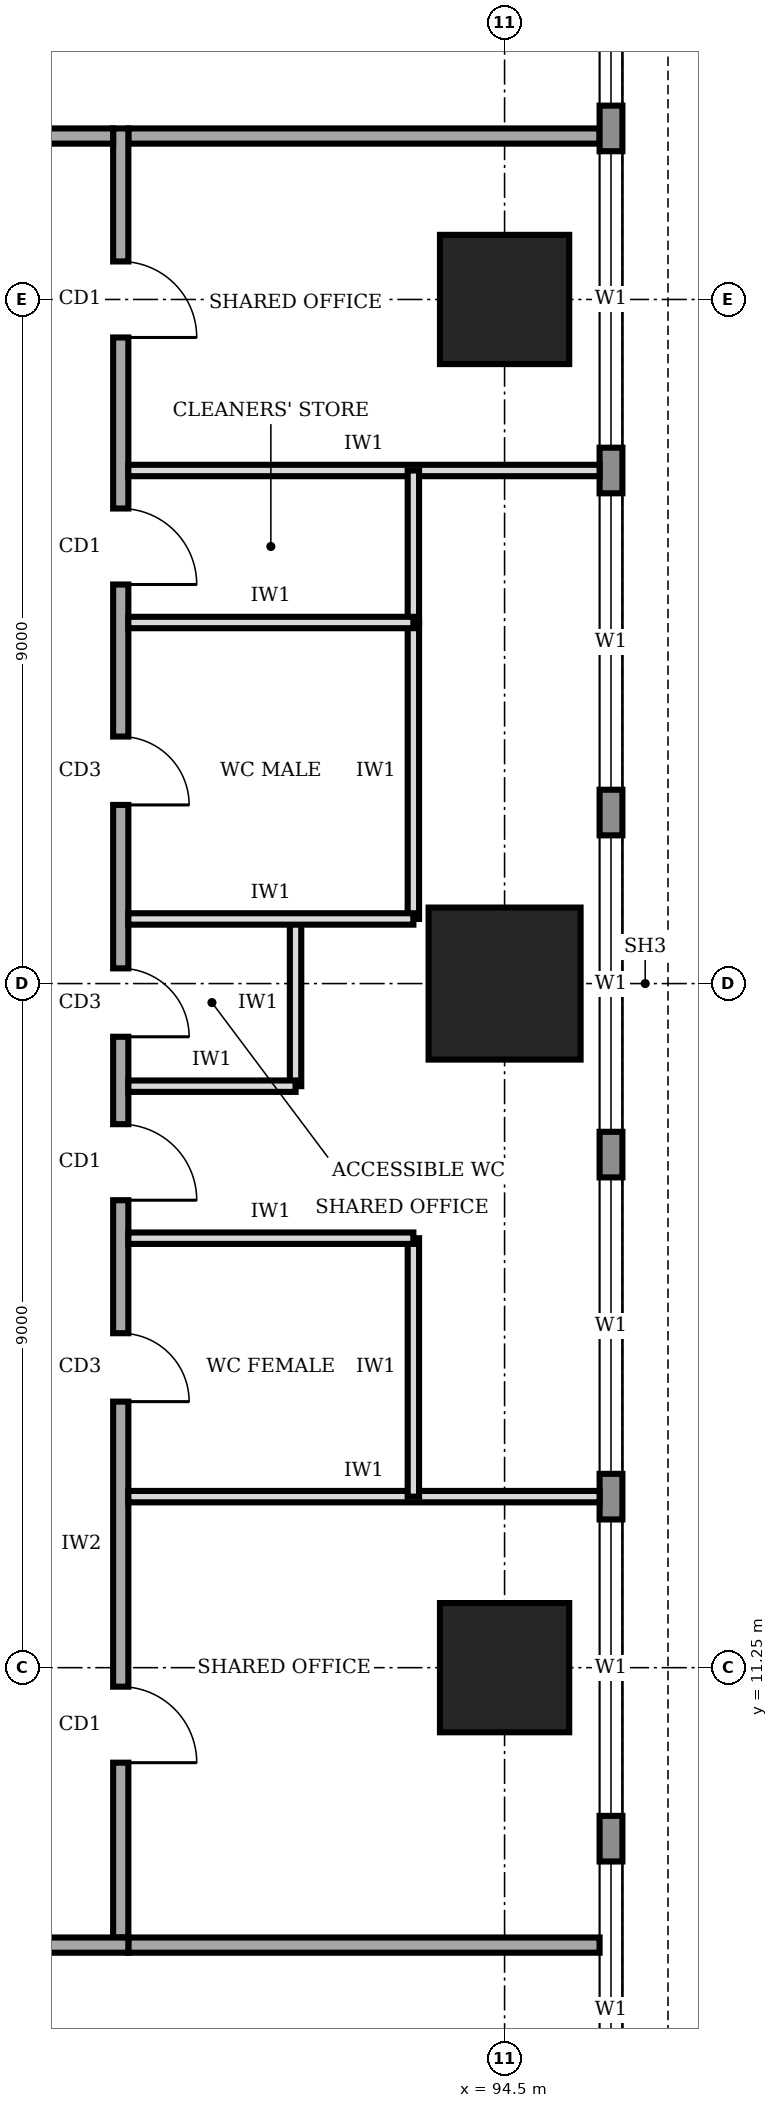
"""IFC4 building model, lengths in metres.
Left out: names, types, materials, properties, quantities, classifications, styles, units other than length and angle.
Written with IfcOpenShell. Run it as: python <this file> out.ifc"""

import sys

from ifc_helpers import new_model, si_unit, direction, frame, frame_2d, origin, origin_2d, place, context, subcontext, project, spatial, rectangle, extrude, element, fill, save


model = new_model("IFC4")
c1 = context("Model", 3, precision=1e-05, world=origin(), true_north=direction((0.0, 1.0)))
c2 = subcontext(c1, "Body", "Model", "MODEL_VIEW")
j1 = project(units=[si_unit("LENGTHUNIT", "METRE"), si_unit("PLANEANGLEUNIT", "RADIAN")], contexts=[c1])
p1 = place(None, origin())
s1 = spatial("IfcSite", under=j1, at=p1, CompositionType="ELEMENT")
p2 = place(p1, origin())
s2 = spatial("IfcBuilding", under=s1, at=p2, CompositionType="ELEMENT")
p3 = place(p2, frame((0.0, 0.0, 209.0)))
s3 = spatial("IfcBuildingStorey", under=s2, at=p3, CompositionType="ELEMENT", Elevation=209.0)
p4 = place(p3, frame((94.5, 11.25, 0.0), z_axis=(0.0, 0.0, 1.0), x_axis=(1.0, 0.0, 0.0)))
e1 = element("IfcColumn", 1, at=p4, inside=s3, PredefinedType="COLUMN", context=c2, shape_type="SweptSolid", body=[
    extrude(rectangle(XDim=1.7, YDim=1.7, at=origin_2d()), origin(), (0.0, 0.0, 1.0), 4.0),
])
p5 = place(p3, frame((94.5, 20.25, 0.0), z_axis=(0.0, 0.0, 1.0), x_axis=(1.0, 0.0, 0.0)))
e2 = element("IfcColumn", 2, at=p5, inside=s3, PredefinedType="COLUMN", context=c2, shape_type="SweptSolid", body=[
    extrude(rectangle(XDim=2.0, YDim=2.0, at=origin_2d()), origin(), (0.0, 0.0, 1.0), 4.0),
])
p6 = place(p3, frame((94.5, 29.25, 0.0), z_axis=(0.0, 0.0, 1.0), x_axis=(1.0, 0.0, 0.0)))
e3 = element("IfcColumn", 3, at=p6, inside=s3, PredefinedType="COLUMN", context=c2, shape_type="SweptSolid", body=[
    extrude(rectangle(XDim=1.7, YDim=1.7, at=origin_2d()), origin(), (0.0, 0.0, 1.0), 4.0),
])
p7 = place(p3, frame((95.9, 3.32, 0.0), z_axis=(0.0, 0.0, 1.0), x_axis=(0.0, 1.0, 0.0)))
e4 = element("IfcWall", 4, at=p7, inside=s3, PredefinedType="STANDARD", context=c2, shape_type="SweptSolid", body=[
    extrude(rectangle(XDim=33.86, YDim=0.3, at=frame_2d((16.93, 0.0))), origin(), (0.0, 0.0, 1.0), 3.75),
])
p8 = place(p7, frame((1.48, 0.0, 0.9)))
e5 = element("IfcOpeningElement", 5, at=p8, cuts=e4, PredefinedType="OPENING", context=c2, shape_type="SweptSolid", body=[
    extrude(rectangle(XDim=3.9, YDim=2.2, at=frame_2d((1.95, 1.1))), frame((0.0, 0.16, 0.0), z_axis=(0.0, -1.0, 0.0), x_axis=(1.0, 0.0, 0.0)), (0.0, 0.0, 1.0), 0.32),
])
p9 = place(p7, frame((5.98, 0.0, 0.9)))
e6 = element("IfcOpeningElement", 6, at=p9, cuts=e4, PredefinedType="OPENING", context=c2, shape_type="SweptSolid", body=[
    extrude(rectangle(XDim=3.9, YDim=2.2, at=frame_2d((1.95, 1.1))), frame((0.0, 0.16, 0.0), z_axis=(0.0, -1.0, 0.0), x_axis=(1.0, 0.0, 0.0)), (0.0, 0.0, 1.0), 0.32),
])
p10 = place(p7, frame((10.48, 0.0, 0.9)))
e7 = element("IfcOpeningElement", 7, at=p10, cuts=e4, PredefinedType="OPENING", context=c2, shape_type="SweptSolid", body=[
    extrude(rectangle(XDim=3.9, YDim=2.2, at=frame_2d((1.95, 1.1))), frame((0.0, 0.16, 0.0), z_axis=(0.0, -1.0, 0.0), x_axis=(1.0, 0.0, 0.0)), (0.0, 0.0, 1.0), 0.32),
])
p11 = place(p7, frame((14.98, 0.0, 0.9)))
e8 = element("IfcOpeningElement", 8, at=p11, cuts=e4, PredefinedType="OPENING", context=c2, shape_type="SweptSolid", body=[
    extrude(rectangle(XDim=3.9, YDim=2.2, at=frame_2d((1.95, 1.1))), frame((0.0, 0.16, 0.0), z_axis=(0.0, -1.0, 0.0), x_axis=(1.0, 0.0, 0.0)), (0.0, 0.0, 1.0), 0.32),
])
p12 = place(p7, frame((19.48, 0.0, 0.9)))
e9 = element("IfcOpeningElement", 9, at=p12, cuts=e4, PredefinedType="OPENING", context=c2, shape_type="SweptSolid", body=[
    extrude(rectangle(XDim=3.9, YDim=2.2, at=frame_2d((1.95, 1.1))), frame((0.0, 0.16, 0.0), z_axis=(0.0, -1.0, 0.0), x_axis=(1.0, 0.0, 0.0)), (0.0, 0.0, 1.0), 0.32),
])
p13 = place(p7, frame((23.98, 0.0, 0.9)))
e10 = element("IfcOpeningElement", 10, at=p13, cuts=e4, PredefinedType="OPENING", context=c2, shape_type="SweptSolid", body=[
    extrude(rectangle(XDim=3.9, YDim=2.2, at=frame_2d((1.95, 1.1))), frame((0.0, 0.16, 0.0), z_axis=(0.0, -1.0, 0.0), x_axis=(1.0, 0.0, 0.0)), (0.0, 0.0, 1.0), 0.32),
])
p14 = place(p7, frame((28.48, 0.0, 0.9)))
e11 = element("IfcOpeningElement", 11, at=p14, cuts=e4, PredefinedType="OPENING", context=c2, shape_type="SweptSolid", body=[
    extrude(rectangle(XDim=3.9, YDim=2.2, at=frame_2d((1.95, 1.1))), frame((0.0, 0.16, 0.0), z_axis=(0.0, -1.0, 0.0), x_axis=(1.0, 0.0, 0.0)), (0.0, 0.0, 1.0), 0.32),
])
p15 = place(p3, frame((72.65, 7.6, 0.0), z_axis=(0.0, 0.0, 1.0), x_axis=(1.0, 0.0, 0.0)))
e12 = element("IfcWall", 12, at=p15, inside=s3, PredefinedType="SOLIDWALL", context=c2, shape_type="SweptSolid", body=[
    extrude(rectangle(XDim=16.9, YDim=0.2, at=frame_2d((8.45, 0.0))), origin(), (0.0, 0.0, 1.0), 3.75),
])
p16 = place(p15, frame((7.45, 0.0, 0.0)))
e13 = element("IfcOpeningElement", 13, at=p16, cuts=e12, PredefinedType="OPENING", context=c2, shape_type="SweptSolid", body=[
    extrude(rectangle(XDim=1.8, YDim=2.1, at=frame_2d((0.9, 1.05))), frame((0.0, 0.11, 0.0), z_axis=(0.0, -1.0, 0.0), x_axis=(1.0, 0.0, 0.0)), (0.0, 0.0, 1.0), 0.22),
])
p17 = place(p3, frame((89.45, 7.7, 0.0), z_axis=(0.0, 0.0, 1.0), x_axis=(0.0, 1.0, 0.0)))
e14 = element("IfcWall", 14, at=p17, inside=s3, PredefinedType="SOLIDWALL", context=c2, shape_type="SweptSolid", body=[
    extrude(rectangle(XDim=23.8, YDim=0.2, at=frame_2d((11.9, 0.0))), origin(), (0.0, 0.0, 1.0), 3.75),
])
p18 = place(p17, frame((2.3, 0.0, 0.0)))
e15 = element("IfcOpeningElement", 15, at=p18, cuts=e14, PredefinedType="OPENING", context=c2, shape_type="SweptSolid", body=[
    extrude(rectangle(XDim=1.0, YDim=2.1, at=frame_2d((0.5, 1.05))), frame((0.0, 0.11, 0.0), z_axis=(0.0, -1.0, 0.0), x_axis=(1.0, 0.0, 0.0)), (0.0, 0.0, 1.0), 0.22),
])
p19 = place(p17, frame((7.05, 0.0, 0.0)))
e16 = element("IfcOpeningElement", 16, at=p19, cuts=e14, PredefinedType="OPENING", context=c2, shape_type="SweptSolid", body=[
    extrude(rectangle(XDim=0.9, YDim=2.1, at=frame_2d((0.45, 1.05))), frame((0.0, 0.11, 0.0), z_axis=(0.0, -1.0, 0.0), x_axis=(1.0, 0.0, 0.0)), (0.0, 0.0, 1.0), 0.22),
])
p20 = place(p17, frame((11.85, 0.0, 0.0)))
e17 = element("IfcOpeningElement", 17, at=p20, cuts=e14, PredefinedType="OPENING", context=c2, shape_type="SweptSolid", body=[
    extrude(rectangle(XDim=0.9, YDim=2.1, at=frame_2d((0.45, 1.05))), frame((0.0, 0.11, 0.0), z_axis=(0.0, -1.0, 0.0), x_axis=(1.0, 0.0, 0.0)), (0.0, 0.0, 1.0), 0.22),
])
p21 = place(p17, frame((14.9, 0.0, 0.0)))
e18 = element("IfcOpeningElement", 18, at=p21, cuts=e14, PredefinedType="OPENING", context=c2, shape_type="SweptSolid", body=[
    extrude(rectangle(XDim=0.9, YDim=2.1, at=frame_2d((0.45, 1.05))), frame((0.0, 0.11, 0.0), z_axis=(0.0, -1.0, 0.0), x_axis=(1.0, 0.0, 0.0)), (0.0, 0.0, 1.0), 0.22),
])
p22 = place(p17, frame((17.8, 0.0, 0.0)))
e19 = element("IfcOpeningElement", 19, at=p22, cuts=e14, PredefinedType="OPENING", context=c2, shape_type="SweptSolid", body=[
    extrude(rectangle(XDim=1.0, YDim=2.1, at=frame_2d((0.5, 1.05))), frame((0.0, 0.11, 0.0), z_axis=(0.0, -1.0, 0.0), x_axis=(1.0, 0.0, 0.0)), (0.0, 0.0, 1.0), 0.22),
])
p23 = place(p17, frame((9.7, 0.0, 0.0)))
e20 = element("IfcOpeningElement", 20, at=p23, cuts=e14, PredefinedType="OPENING", context=c2, shape_type="SweptSolid", body=[
    extrude(rectangle(XDim=1.0, YDim=2.1, at=frame_2d((0.5, 1.05))), frame((0.0, 0.11, 0.0), z_axis=(0.0, -1.0, 0.0), x_axis=(1.0, 0.0, 0.0)), (0.0, 0.0, 1.0), 0.22),
])
p24 = place(p17, frame((21.05, 0.0, 0.0)))
e21 = element("IfcOpeningElement", 21, at=p24, cuts=e14, PredefinedType="OPENING", context=c2, shape_type="SweptSolid", body=[
    extrude(rectangle(XDim=1.0, YDim=2.1, at=frame_2d((0.5, 1.05))), frame((0.0, 0.11, 0.0), z_axis=(0.0, -1.0, 0.0), x_axis=(1.0, 0.0, 0.0)), (0.0, 0.0, 1.0), 0.22),
])
p25 = place(p3, frame((89.35, 31.4, 0.0), z_axis=(0.0, 0.0, 1.0), x_axis=(-1.0, 0.0, 0.0)))
e22 = element("IfcWall", 22, at=p25, inside=s3, PredefinedType="SOLIDWALL", context=c2, shape_type="SweptSolid", body=[
    extrude(rectangle(XDim=16.9, YDim=0.2, at=frame_2d((8.45, 0.0))), origin(), (0.0, 0.0, 1.0), 3.75),
])
p26 = place(p25, frame((14.375, 0.0, 0.0)))
e23 = element("IfcOpeningElement", 23, at=p26, cuts=e22, PredefinedType="OPENING", context=c2, shape_type="SweptSolid", body=[
    extrude(rectangle(XDim=1.0, YDim=2.1, at=frame_2d((0.5, 1.05))), frame((0.0, 0.11, 0.0), z_axis=(0.0, -1.0, 0.0), x_axis=(1.0, 0.0, 0.0)), (0.0, 0.0, 1.0), 0.22),
])
p27 = place(p25, frame((10.1, 0.0, 0.0)))
e24 = element("IfcOpeningElement", 24, at=p27, cuts=e22, PredefinedType="OPENING", context=c2, shape_type="SweptSolid", body=[
    extrude(rectangle(XDim=1.0, YDim=2.1, at=frame_2d((0.5, 1.05))), frame((0.0, 0.11, 0.0), z_axis=(0.0, -1.0, 0.0), x_axis=(1.0, 0.0, 0.0)), (0.0, 0.0, 1.0), 0.22),
])
for number, where, z_axis, x_axis in (
    (25, (89.55, 7.6, 0.0), (0.0, 0.0, 1.0), (1.0, 0.0, 0.0)),
    (26, (89.55, 31.4, 0.0), (0.0, 0.0, 1.0), (1.0, 0.0, 0.0)),
):
    element("IfcWall", number, at=place(p3, frame(where, z_axis=z_axis, x_axis=x_axis)), inside=s3, PredefinedType="SOLIDWALL", context=c2, shape_type="SweptSolid", body=[
        extrude(rectangle(XDim=6.2, YDim=0.2, at=frame_2d((3.1, 0.0))), origin(), (0.0, 0.0, 1.0), 3.75),
    ])
for number, where, z_axis, x_axis in (
    (27, (89.55, 13.5, 0.0), (0.0, 0.0, 1.0), (1.0, 0.0, 0.0)),
    (28, (89.55, 27.0, 0.0), (0.0, 0.0, 1.0), (1.0, 0.0, 0.0)),
):
    element("IfcWall", number, at=place(p3, frame(where, z_axis=z_axis, x_axis=x_axis)), inside=s3, PredefinedType="PARTITIONING", context=c2, shape_type="SweptSolid", body=[
        extrude(rectangle(XDim=6.2, YDim=0.15, at=frame_2d((3.1, 0.0))), origin(), (0.0, 0.0, 1.0), 3.75),
    ])
p28 = place(p3, frame((89.55, 16.9, 0.0), z_axis=(0.0, 0.0, 1.0), x_axis=(1.0, 0.0, 0.0)))
e29 = element("IfcWall", 29, at=p28, inside=s3, PredefinedType="PARTITIONING", context=c2, shape_type="SweptSolid", body=[
    extrude(rectangle(XDim=3.75, YDim=0.15, at=frame_2d((1.875, 0.0))), origin(), (0.0, 0.0, 1.0), 3.75),
])
p29 = place(p3, frame((89.55, 18.9, 0.0), z_axis=(0.0, 0.0, 1.0), x_axis=(1.0, 0.0, 0.0)))
e30 = element("IfcWall", 30, at=p29, inside=s3, PredefinedType="PARTITIONING", context=c2, shape_type="SweptSolid", body=[
    extrude(rectangle(XDim=2.2, YDim=0.15, at=frame_2d((1.1, 0.0))), origin(), (0.0, 0.0, 1.0), 3.75),
])
p30 = place(p3, frame((89.55, 21.1, 0.0), z_axis=(0.0, 0.0, 1.0), x_axis=(1.0, 0.0, 0.0)))
e31 = element("IfcWall", 31, at=p30, inside=s3, PredefinedType="PARTITIONING", context=c2, shape_type="SweptSolid", body=[
    extrude(rectangle(XDim=3.75, YDim=0.15, at=frame_2d((1.875, 0.0))), origin(), (0.0, 0.0, 1.0), 2.85),
])
p31 = place(p3, frame((89.55, 25.0, 0.0), z_axis=(0.0, 0.0, 1.0), x_axis=(1.0, 0.0, 0.0)))
e32 = element("IfcWall", 32, at=p31, inside=s3, PredefinedType="PARTITIONING", context=c2, shape_type="SweptSolid", body=[
    extrude(rectangle(XDim=3.75, YDim=0.15, at=frame_2d((1.875, 0.0))), origin(), (0.0, 0.0, 1.0), 3.75),
])
p32 = place(p3, frame((93.3, 13.5, 0.0), z_axis=(0.0, 0.0, 1.0), x_axis=(0.0, 1.0, 0.0)))
e33 = element("IfcWall", 33, at=p32, inside=s3, PredefinedType="PARTITIONING", context=c2, shape_type="SweptSolid", body=[
    extrude(rectangle(XDim=3.4, YDim=0.15, at=frame_2d((1.7, 0.0))), origin(), (0.0, 0.0, 1.0), 3.75),
])
p33 = place(p3, frame((91.75, 18.9, 0.0), z_axis=(0.0, 0.0, 1.0), x_axis=(0.0, 1.0, 0.0)))
e34 = element("IfcWall", 34, at=p33, inside=s3, PredefinedType="PARTITIONING", context=c2, shape_type="SweptSolid", body=[
    extrude(rectangle(XDim=2.2, YDim=0.15, at=frame_2d((1.1, 0.0))), origin(), (0.0, 0.0, 1.0), 3.75),
])
p34 = place(p3, frame((93.3, 21.1, 0.0), z_axis=(0.0, 0.0, 1.0), x_axis=(0.0, 1.0, 0.0)))
e35 = element("IfcWall", 35, at=p34, inside=s3, PredefinedType="PARTITIONING", context=c2, shape_type="SweptSolid", body=[
    extrude(rectangle(XDim=3.9, YDim=0.15, at=frame_2d((1.95, 0.0))), origin(), (0.0, 0.0, 1.0), 3.75),
])
p35 = place(p3, frame((93.3, 25.0, 0.0), z_axis=(0.0, 0.0, 1.0), x_axis=(0.0, 1.0, 0.0)))
e36 = element("IfcWall", 36, at=p35, inside=s3, PredefinedType="PARTITIONING", context=c2, shape_type="SweptSolid", body=[
    extrude(rectangle(XDim=2.0, YDim=0.15, at=frame_2d((1.0, 0.0))), origin(), (0.0, 0.0, 1.0), 3.75),
])
p36 = place(p8, origin())
e37 = element("IfcWindow", 37, at=p36, inside=s3, PartitioningType="SINGLE_PANEL", PredefinedType="WINDOW", context=c2, shape_type="SweptSolid", body=[
    extrude(rectangle(XDim=3.9, YDim=2.2, at=frame_2d((1.95, 1.1))), frame((0.0, 0.03, 0.0), z_axis=(0.0, -1.0, 0.0), x_axis=(1.0, 0.0, 0.0)), (0.0, 0.0, 1.0), 0.06),
])
fill(e5, e37)
p37 = place(p9, origin())
e38 = element("IfcWindow", 38, at=p37, inside=s3, PartitioningType="SINGLE_PANEL", PredefinedType="WINDOW", context=c2, shape_type="SweptSolid", body=[
    extrude(rectangle(XDim=3.9, YDim=2.2, at=frame_2d((1.95, 1.1))), frame((0.0, 0.03, 0.0), z_axis=(0.0, -1.0, 0.0), x_axis=(1.0, 0.0, 0.0)), (0.0, 0.0, 1.0), 0.06),
])
fill(e6, e38)
p38 = place(p10, origin())
e39 = element("IfcWindow", 39, at=p38, inside=s3, PartitioningType="SINGLE_PANEL", PredefinedType="WINDOW", context=c2, shape_type="SweptSolid", body=[
    extrude(rectangle(XDim=3.9, YDim=2.2, at=frame_2d((1.95, 1.1))), frame((0.0, 0.03, 0.0), z_axis=(0.0, -1.0, 0.0), x_axis=(1.0, 0.0, 0.0)), (0.0, 0.0, 1.0), 0.06),
])
fill(e7, e39)
p39 = place(p11, origin())
e40 = element("IfcWindow", 40, at=p39, inside=s3, PartitioningType="SINGLE_PANEL", PredefinedType="WINDOW", context=c2, shape_type="SweptSolid", body=[
    extrude(rectangle(XDim=3.9, YDim=2.2, at=frame_2d((1.95, 1.1))), frame((0.0, 0.03, 0.0), z_axis=(0.0, -1.0, 0.0), x_axis=(1.0, 0.0, 0.0)), (0.0, 0.0, 1.0), 0.06),
])
fill(e8, e40)
p40 = place(p12, origin())
e41 = element("IfcWindow", 41, at=p40, inside=s3, PartitioningType="SINGLE_PANEL", PredefinedType="WINDOW", context=c2, shape_type="SweptSolid", body=[
    extrude(rectangle(XDim=3.9, YDim=2.2, at=frame_2d((1.95, 1.1))), frame((0.0, 0.03, 0.0), z_axis=(0.0, -1.0, 0.0), x_axis=(1.0, 0.0, 0.0)), (0.0, 0.0, 1.0), 0.06),
])
fill(e9, e41)
p41 = place(p13, origin())
e42 = element("IfcWindow", 42, at=p41, inside=s3, PartitioningType="SINGLE_PANEL", PredefinedType="WINDOW", context=c2, shape_type="SweptSolid", body=[
    extrude(rectangle(XDim=3.9, YDim=2.2, at=frame_2d((1.95, 1.1))), frame((0.0, 0.03, 0.0), z_axis=(0.0, -1.0, 0.0), x_axis=(1.0, 0.0, 0.0)), (0.0, 0.0, 1.0), 0.06),
])
fill(e10, e42)
p42 = place(p14, origin())
e43 = element("IfcWindow", 43, at=p42, inside=s3, PartitioningType="SINGLE_PANEL", PredefinedType="WINDOW", context=c2, shape_type="SweptSolid", body=[
    extrude(rectangle(XDim=3.9, YDim=2.2, at=frame_2d((1.95, 1.1))), frame((0.0, 0.03, 0.0), z_axis=(0.0, -1.0, 0.0), x_axis=(1.0, 0.0, 0.0)), (0.0, 0.0, 1.0), 0.06),
])
fill(e11, e43)
p43 = place(p18, frame((1.0, 0.0, 0.0), z_axis=(0.0, 0.0, 1.0), x_axis=(-1.0, 0.0, 0.0)))
e44 = element("IfcDoor", 44, at=p43, inside=s3, OperationType="SINGLE_SWING_RIGHT", PredefinedType="DOOR", context=c2, shape_type="SweptSolid", body=[
    extrude(rectangle(XDim=1.0, YDim=2.1, at=frame_2d((0.5, 1.05))), frame((0.0, 0.025, 0.0), z_axis=(0.0, -1.0, 0.0), x_axis=(1.0, 0.0, 0.0)), (0.0, 0.0, 1.0), 0.05),
])
fill(e15, e44)
p44 = place(p19, frame((0.9, 0.0, 0.0), z_axis=(0.0, 0.0, 1.0), x_axis=(-1.0, 0.0, 0.0)))
e45 = element("IfcDoor", 45, at=p44, inside=s3, OperationType="SINGLE_SWING_RIGHT", PredefinedType="DOOR", context=c2, shape_type="SweptSolid", body=[
    extrude(rectangle(XDim=0.9, YDim=2.1, at=frame_2d((0.45, 1.05))), frame((0.0, 0.025, 0.0), z_axis=(0.0, -1.0, 0.0), x_axis=(1.0, 0.0, 0.0)), (0.0, 0.0, 1.0), 0.05),
])
fill(e16, e45)
p45 = place(p20, frame((0.9, 0.0, 0.0), z_axis=(0.0, 0.0, 1.0), x_axis=(-1.0, 0.0, 0.0)))
e46 = element("IfcDoor", 46, at=p45, inside=s3, OperationType="SINGLE_SWING_RIGHT", PredefinedType="DOOR", context=c2, shape_type="SweptSolid", body=[
    extrude(rectangle(XDim=0.9, YDim=2.1, at=frame_2d((0.45, 1.05))), frame((0.0, 0.025, 0.0), z_axis=(0.0, -1.0, 0.0), x_axis=(1.0, 0.0, 0.0)), (0.0, 0.0, 1.0), 0.05),
])
fill(e17, e46)
p46 = place(p21, frame((0.9, 0.0, 0.0), z_axis=(0.0, 0.0, 1.0), x_axis=(-1.0, 0.0, 0.0)))
e47 = element("IfcDoor", 47, at=p46, inside=s3, OperationType="SINGLE_SWING_RIGHT", PredefinedType="DOOR", context=c2, shape_type="SweptSolid", body=[
    extrude(rectangle(XDim=0.9, YDim=2.1, at=frame_2d((0.45, 1.05))), frame((0.0, 0.025, 0.0), z_axis=(0.0, -1.0, 0.0), x_axis=(1.0, 0.0, 0.0)), (0.0, 0.0, 1.0), 0.05),
])
fill(e18, e47)
p47 = place(p22, frame((1.0, 0.0, 0.0), z_axis=(0.0, 0.0, 1.0), x_axis=(-1.0, 0.0, 0.0)))
e48 = element("IfcDoor", 48, at=p47, inside=s3, OperationType="SINGLE_SWING_RIGHT", PredefinedType="DOOR", context=c2, shape_type="SweptSolid", body=[
    extrude(rectangle(XDim=1.0, YDim=2.1, at=frame_2d((0.5, 1.05))), frame((0.0, 0.025, 0.0), z_axis=(0.0, -1.0, 0.0), x_axis=(1.0, 0.0, 0.0)), (0.0, 0.0, 1.0), 0.05),
])
fill(e19, e48)
p48 = place(p23, frame((1.0, 0.0, 0.0), z_axis=(0.0, 0.0, 1.0), x_axis=(-1.0, 0.0, 0.0)))
e49 = element("IfcDoor", 49, at=p48, inside=s3, OperationType="SINGLE_SWING_RIGHT", PredefinedType="DOOR", context=c2, shape_type="SweptSolid", body=[
    extrude(rectangle(XDim=1.0, YDim=2.1, at=frame_2d((0.5, 1.05))), frame((0.0, 0.025, 0.0), z_axis=(0.0, -1.0, 0.0), x_axis=(1.0, 0.0, 0.0)), (0.0, 0.0, 1.0), 0.05),
])
fill(e20, e49)
p49 = place(p24, frame((1.0, 0.0, 0.0), z_axis=(0.0, 0.0, 1.0), x_axis=(-1.0, 0.0, 0.0)))
e50 = element("IfcDoor", 50, at=p49, inside=s3, OperationType="SINGLE_SWING_RIGHT", PredefinedType="DOOR", context=c2, shape_type="SweptSolid", body=[
    extrude(rectangle(XDim=1.0, YDim=2.1, at=frame_2d((0.5, 1.05))), frame((0.0, 0.025, 0.0), z_axis=(0.0, -1.0, 0.0), x_axis=(1.0, 0.0, 0.0)), (0.0, 0.0, 1.0), 0.05),
])
fill(e21, e50)
save(model, sys.argv[1])
